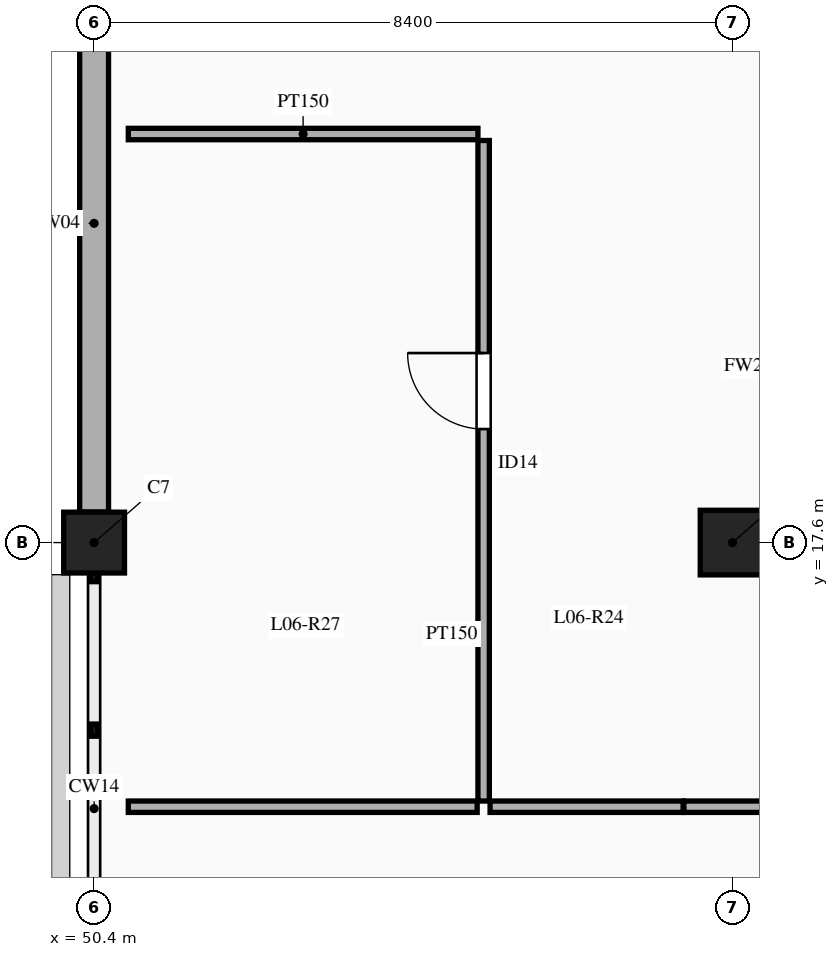
"""IFC4 building model, lengths in metres.
Left out: names, types, materials, properties, quantities, classifications, styles, units other than length and angle.
Written with IfcOpenShell. Run it as: python <this file> out.ifc"""

import sys

from ifc_helpers import new_model, si_unit, direction, frame, frame_2d, origin, origin_2d, place, context, subcontext, project, spatial, rectangle, extrude, element, fill, save


model = new_model("IFC4")
c1 = context("Model", 3, precision=1e-05, world=origin(), true_north=direction((0.0, 1.0)))
c2 = subcontext(c1, "Body", "Model", "MODEL_VIEW")
j1 = project(units=[si_unit("LENGTHUNIT", "METRE"), si_unit("PLANEANGLEUNIT", "RADIAN")], contexts=[c1])
p1 = place(None, origin())
s1 = spatial("IfcSite", under=j1, at=p1, CompositionType="ELEMENT")
p2 = place(p1, origin())
s2 = spatial("IfcBuilding", under=s1, at=p2, CompositionType="ELEMENT")
p3 = place(p2, frame((0.0, 0.0, 28.5)))
s3 = spatial("IfcBuildingStorey", under=s2, at=p3, CompositionType="ELEMENT", Elevation=28.5)
p4 = place(p3, frame((50.4, 17.6, 0.0), z_axis=(0.0, 0.0, 1.0), x_axis=(1.0, 0.0, 0.0)))
e1 = element("IfcColumn", 1, at=p4, inside=s3, PredefinedType="COLUMN", context=c2, shape_type="SweptSolid", body=[
    extrude(rectangle(XDim=0.8, YDim=0.8, at=origin_2d()), origin(), (0.0, 0.0, 1.0), 4.5),
])
p5 = place(p3, frame((58.8, 17.6, 0.0), z_axis=(0.0, 0.0, 1.0), x_axis=(1.0, 0.0, 0.0)))
e2 = element("IfcColumn", 2, at=p5, inside=s3, PredefinedType="COLUMN", context=c2, shape_type="SweptSolid", body=[
    extrude(rectangle(XDim=0.85, YDim=0.85, at=origin_2d()), origin(), (0.0, 0.0, 1.0), 4.5),
])
p6 = place(p3, frame((50.4, 18.002, 0.0), z_axis=(0.0, 0.0, 1.0), x_axis=(0.0, 1.0, 0.0)))
e3 = element("IfcWall", 3, at=p6, inside=s3, PredefinedType="SOLIDWALL", context=c2, shape_type="SweptSolid", body=[
    extrude(rectangle(XDim=7.596, YDim=0.38, at=frame_2d((3.798, 0.0))), origin(), (0.0, 0.0, 1.0), 3.55),
])
p7 = place(p3, frame((50.85, 22.975, 0.0), z_axis=(0.0, 0.0, 1.0), x_axis=(1.0, 0.0, 0.0)))
e4 = element("IfcWall", 4, at=p7, inside=s3, PredefinedType="PARTITIONING", context=c2, shape_type="SweptSolid", body=[
    extrude(rectangle(XDim=4.6, YDim=0.15, at=frame_2d((2.3, 0.0))), origin(), (0.0, 0.0, 1.0), 3.45),
])
p8 = place(p3, frame((55.525, 14.2, 0.0), z_axis=(0.0, 0.0, 1.0), x_axis=(0.0, 1.0, 0.0)))
e5 = element("IfcWall", 5, at=p8, inside=s3, PredefinedType="PARTITIONING", context=c2, shape_type="SweptSolid", body=[
    extrude(rectangle(XDim=8.69, YDim=0.15, at=frame_2d((4.345, 0.0))), origin(), (0.0, 0.0, 1.0), 3.45),
])
p9 = place(p8, frame((4.894, 0.0, 0.0)))
e6 = element("IfcOpeningElement", 6, at=p9, cuts=e5, PredefinedType="OPENING", context=c2, shape_type="SweptSolid", body=[
    extrude(rectangle(XDim=1.0, YDim=2.15, at=frame_2d((0.5, 1.075))), frame((0.0, 0.085, 0.0), z_axis=(0.0, -1.0, 0.0), x_axis=(1.0, 0.0, 0.0)), (0.0, 0.0, 1.0), 0.17),
])
p10 = place(p3, frame((55.61, 14.125, 0.0), z_axis=(0.0, 0.0, 1.0), x_axis=(1.0, 0.0, 0.0)))
e7 = element("IfcWall", 7, at=p10, inside=s3, PredefinedType="PARTITIONING", context=c2, shape_type="SweptSolid", body=[
    extrude(rectangle(XDim=2.54, YDim=0.15, at=frame_2d((1.27, 0.0))), origin(), (0.0, 0.0, 1.0), 3.45),
])
p11 = place(p3, frame((58.16, 14.125, 0.0), z_axis=(0.0, 0.0, 1.0), x_axis=(1.0, 0.0, 0.0)))
e8 = element("IfcWall", 8, at=p11, inside=s3, PredefinedType="PARTITIONING", context=c2, shape_type="SweptSolid", body=[
    extrude(rectangle(XDim=21.44, YDim=0.15, at=frame_2d((10.72, 0.0))), origin(), (0.0, 0.0, 1.0), 3.45),
])
p12 = place(p11, frame((10.145, 0.0, 0.0)))
e9 = element("IfcOpeningElement", 9, at=p12, cuts=e8, PredefinedType="OPENING", context=c2, shape_type="SweptSolid", body=[
    extrude(rectangle(XDim=1.0, YDim=2.15, at=frame_2d((0.5, 1.075))), frame((0.0, 0.085, 0.0), z_axis=(0.0, -1.0, 0.0), x_axis=(1.0, 0.0, 0.0)), (0.0, 0.0, 1.0), 0.17),
])
p13 = place(p3, frame((50.85, 14.125, 0.0), z_axis=(0.0, 0.0, 1.0), x_axis=(1.0, 0.0, 0.0)))
e10 = element("IfcWall", 10, at=p13, inside=s3, PredefinedType="PARTITIONING", context=c2, shape_type="SweptSolid", body=[
    extrude(rectangle(XDim=4.59, YDim=0.15, at=frame_2d((2.295, 0.0))), origin(), (0.0, 0.0, 1.0), 3.45),
])
p14 = place(p9, origin())
e11 = element("IfcDoor", 11, at=p14, inside=s3, OperationType="SINGLE_SWING_RIGHT", PredefinedType="DOOR", context=c2, shape_type="SweptSolid", body=[
    extrude(rectangle(XDim=1.0, YDim=2.15, at=frame_2d((0.5, 1.075))), frame((0.0, 0.025, 0.0), z_axis=(0.0, -1.0, 0.0), x_axis=(1.0, 0.0, 0.0)), (0.0, 0.0, 1.0), 0.05),
])
fill(e6, e11)
save(model, sys.argv[1])
